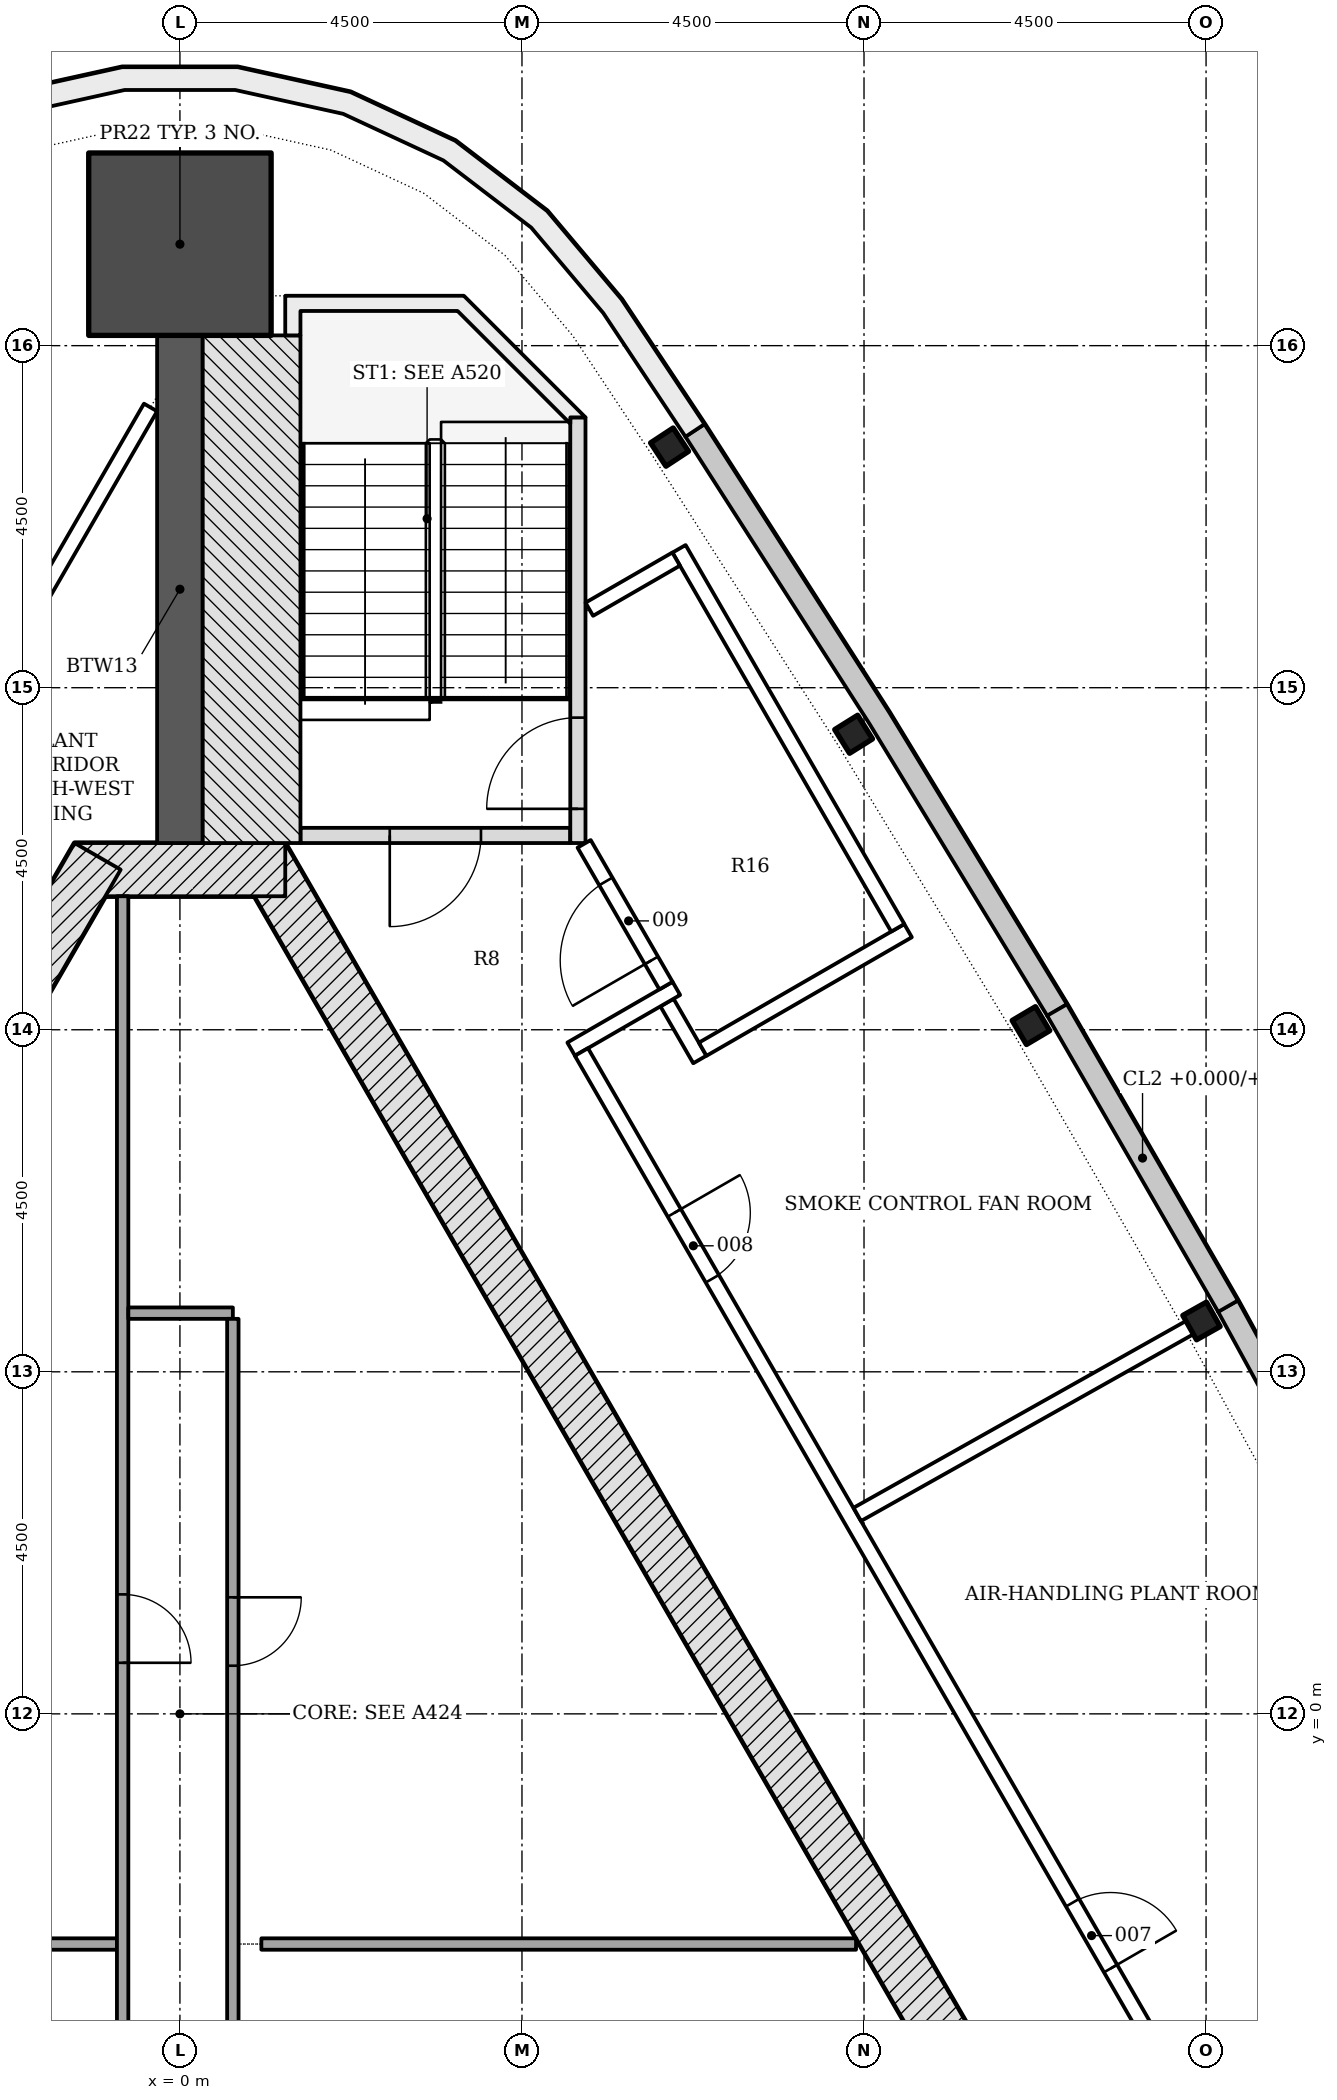
"""IFC4 building model, lengths in metres.
Left out: names, types, materials, properties, quantities, classifications, styles, units other than length and angle.
Written with IfcOpenShell. Run it as: python <this file> out.ifc"""

import sys

from ifc_helpers import new_model, si_unit, direction, frame, frame_2d, origin, origin_2d, place, context, subcontext, project, spatial, polyline, rectangle, i_section, outline, extrude, element, fill, save


model = new_model("IFC4")
c1 = context("Model", 3, precision=1e-05, world=origin(), true_north=direction((0.0, 1.0)))
c2 = subcontext(c1, "Body", "Model", "MODEL_VIEW")
j1 = project(units=[si_unit("LENGTHUNIT", "METRE"), si_unit("PLANEANGLEUNIT", "RADIAN")], contexts=[c1])
p1 = place(None, origin())
s1 = spatial("IfcSite", under=j1, at=p1, CompositionType="ELEMENT")
p2 = place(p1, origin())
s2 = spatial("IfcBuilding", under=s1, at=p2, CompositionType="ELEMENT")
p3 = place(p2, frame((0.0, 0.0, 297.6)))
s3 = spatial("IfcBuildingStorey", under=s2, at=p3, CompositionType="ELEMENT", Elevation=297.6)
p4 = place(p3, frame((10.311, -4.703, -0.25), z_axis=(0.0, 0.0, 1.0), x_axis=(-0.500001446645, 0.866024568562, 0.0)))
e1 = element("IfcWall", 1, at=p4, inside=s3, PredefinedType="SHEAR", context=c2, shape_type="SweptSolid", body=[
    extrude(rectangle(XDim=18.458, YDim=0.7, at=frame_2d((9.229, 0.0))), origin(), (0.0, 0.0, 1.0), 4.5),
])
p5 = place(p3, frame((1.386, 11.106, -0.25), z_axis=(0.0, 0.0, 1.0), x_axis=(-1.0, 0.0, 0.0)))
e2 = element("IfcWall", 2, at=p5, inside=s3, PredefinedType="SHEAR", context=c2, shape_type="SweptSolid", body=[
    extrude(rectangle(XDim=2.771, YDim=0.7, at=frame_2d((1.386, 0.0))), origin(), (0.0, 0.0, 1.0), 4.5),
])
p6 = place(p3, frame((-1.083, 11.281, -0.25), z_axis=(0.0, 0.0, 1.0), x_axis=(-0.500001446645, -0.866024568562, 0.0)))
e3 = element("IfcWall", 3, at=p6, inside=s3, PredefinedType="SHEAR", context=c2, shape_type="SweptSolid", body=[
    extrude(rectangle(XDim=18.458, YDim=0.7, at=frame_2d((9.229, 0.0))), origin(), (0.0, 0.0, 1.0), 4.5),
])
p7 = place(p6, frame((8.979, 0.0, 0.25)))
e4 = element("IfcOpeningElement", 4, at=p7, cuts=e3, PredefinedType="OPENING", context=c2, shape_type="SweptSolid", body=[
    extrude(rectangle(XDim=1.2, YDim=2.1, at=frame_2d((0.6, 1.05))), frame((0.0, 0.36, 0.0), z_axis=(0.0, -1.0, 0.0), x_axis=(1.0, 0.0, 0.0)), (0.0, 0.0, 1.0), 0.72),
])
p8 = place(p6, frame((11.029, 0.0, 0.25)))
e5 = element("IfcOpeningElement", 5, at=p8, cuts=e3, PredefinedType="OPENING", context=c2, shape_type="SweptSolid", body=[
    extrude(rectangle(XDim=1.2, YDim=2.1, at=frame_2d((0.6, 1.05))), frame((0.0, 0.36, 0.0), z_axis=(0.0, -1.0, 0.0), x_axis=(1.0, 0.0, 0.0)), (0.0, 0.0, 1.0), 0.72),
])
p9 = place(p3, frame((0.0, 11.456, -0.25), z_axis=(0.0, 0.0, 1.0), x_axis=(0.0, 1.0, 0.0)))
e6 = element("IfcWall", 6, at=p9, inside=s3, PredefinedType="SHEAR", context=c2, shape_type="SweptSolid", body=[
    extrude(rectangle(XDim=6.679, YDim=0.6, at=frame_2d((3.339, 0.0))), origin(), (0.0, 0.0, 1.0), 4.5),
])
p10 = place(p3, frame((0.0, 19.335, -0.25), z_axis=(0.0, 0.0, 1.0), x_axis=(0.0, 1.0, 0.0)))
e7 = element("IfcColumn", 7, at=p10, inside=s3, PredefinedType="COLUMN", context=c2, shape_type="SweptSolid", body=[
    extrude(rectangle(XDim=2.4, YDim=2.4, at=origin_2d()), origin(), (0.0, 0.0, 1.0), 4.5),
])
for number, where, z_axis, x_axis in (
    (8, (13.44, 5.169, -0.25), (0.0, 0.0, 1.0), (-0.49, 0.872, 0.0)),
    (9, (11.196, 9.055, -0.25), (0.0, 0.0, 1.0), (-0.51, 0.86, 0.0)),
    (10, (8.863, 12.888, -0.25), (0.0, 0.0, 1.0), (-0.53, 0.848, 0.0)),
    (11, (6.442, 16.666, -0.25), (0.0, 0.0, 1.0), (-0.549, 0.836, 0.0)),
):
    element("IfcColumn", number, at=place(p3, frame(where, z_axis=z_axis, x_axis=x_axis)), inside=s3, PredefinedType="COLUMN", context=c2, shape_type="SweptSolid", body=[
        extrude(i_section(OverallWidth=0.368, OverallDepth=0.356, WebThickness=0.011, FlangeThickness=0.018, FilletRadius=0.015, at=origin_2d()), origin(), (0.0, 0.0, 1.0), 4.5),
    ])
p11 = place(p3, origin())
e12 = element("IfcWall", 12, at=p11, inside=s3, PredefinedType="NOTDEFINED", context=c2, shape_type="SweptSolid", body=[
    extrude(outline(polyline([(18.145, -2.507), (16.078, 1.49), (13.919, 5.438), (13.656, 5.294), (15.813, 1.349), (17.878, -2.645), (18.145, -2.507)])), origin(), (0.0, 0.0, 1.0), 4.25),
])
p12 = place(p3, origin())
e13 = element("IfcWall", 13, at=p12, inside=s3, PredefinedType="NOTDEFINED", context=c2, shape_type="SweptSolid", body=[
    extrude(outline(polyline([(11.669, 9.335), (9.33, 13.179), (6.901, 16.968), (6.649, 16.806), (9.075, 13.02), (11.413, 9.179), (11.669, 9.335)])), origin(), (0.0, 0.0, 1.0), 4.25),
])
p13 = place(p3, origin())
e14 = element("IfcWall", 14, at=p13, inside=s3, PredefinedType="NOTDEFINED", context=c2, shape_type="SweptSolid", body=[
    extrude(outline(polyline([(13.919, 5.438), (11.669, 9.335), (11.409, 9.185), (13.659, 5.288), (13.919, 5.438)])), origin(), (0.0, 0.0, 1.0), 1.2),
])
p14 = place(p3, origin())
e15 = element("IfcWall", 15, at=p14, inside=s3, PredefinedType="NOTDEFINED", context=c2, shape_type="SweptSolid", body=[
    extrude(outline(polyline([(11.244, -14.46), (13.211, -14.336), (14.708, -14.069), (16.111, -13.485), (17.355, -12.611), (18.381, -11.49), (19.141, -10.174), (19.599, -8.724), (19.733, -7.21), (19.538, -5.703), (19.021, -4.273), (18.145, -2.507), (17.876, -2.64), (18.745, -4.391), (19.244, -5.774), (19.432, -7.216), (19.303, -8.665), (18.865, -10.052), (18.138, -11.312), (17.156, -12.385), (15.965, -13.22), (14.623, -13.779), (13.176, -14.038), (11.225, -14.161), (11.244, -14.46)])), origin(), (0.0, 0.0, 1.0), 4.25),
])
p15 = place(p3, origin())
e16 = element("IfcWall", 16, at=p15, inside=s3, PredefinedType="NOTDEFINED", context=c2, shape_type="SweptSolid", body=[
    extrude(outline(polyline([(6.901, 16.968), (5.81, 18.61), (4.83, 19.771), (3.623, 20.695), (2.244, 21.335), (0.76, 21.664), (-0.76, 21.664), (-2.244, 21.335), (-3.623, 20.695), (-4.83, 19.771), (-5.81, 18.61), (-6.901, 16.968), (-6.651, 16.802), (-5.569, 18.429), (-4.622, 19.553), (-3.466, 20.437), (-2.147, 21.05), (-0.727, 21.364), (0.727, 21.364), (2.147, 21.05), (3.466, 20.437), (4.622, 19.553), (5.569, 18.429), (6.651, 16.802), (6.901, 16.968)])), origin(), (0.0, 0.0, 1.0), 4.25),
])
p16 = place(p3, frame((-8.895, -3.028, 0.0), z_axis=(0.0, 0.0, 1.0), x_axis=(1.0, 0.0, 0.0)))
e17 = element("IfcWall", 17, at=p16, inside=s3, PredefinedType="PARTITIONING", context=c2, shape_type="SweptSolid", body=[
    extrude(rectangle(XDim=8.066, YDim=0.15, at=frame_2d((4.033, 0.0))), origin(), (0.0, 0.0, 1.0), 4.25),
])
p17 = place(p3, frame((-0.754, 10.756, 0.0), z_axis=(0.0, 0.0, 1.0), x_axis=(0.0, -1.0, 0.0)))
e18 = element("IfcWall", 18, at=p17, inside=s3, PredefinedType="PARTITIONING", context=c2, shape_type="SweptSolid", body=[
    extrude(rectangle(XDim=16.985, YDim=0.15, at=frame_2d((8.492, 0.0))), origin(), (0.0, 0.0, 1.0), 4.25),
])
p18 = place(p17, frame((9.185, 0.0, 0.0)))
e19 = element("IfcOpeningElement", 19, at=p18, cuts=e18, PredefinedType="OPENING", context=c2, shape_type="SweptSolid", body=[
    extrude(rectangle(XDim=0.9, YDim=2.1, at=frame_2d((0.45, 1.05))), frame((0.0, 0.085, 0.0), z_axis=(0.0, -1.0, 0.0), x_axis=(1.0, 0.0, 0.0)), (0.0, 0.0, 1.0), 0.17),
])
p19 = place(p3, frame((-0.679, 5.272, 0.0), z_axis=(0.0, 0.0, 1.0), x_axis=(1.0, 0.0, 0.0)))
e20 = element("IfcWall", 20, at=p19, inside=s3, PredefinedType="PARTITIONING", context=c2, shape_type="SweptSolid", body=[
    extrude(rectangle(XDim=1.375, YDim=0.15, at=frame_2d((0.688, 0.0))), origin(), (0.0, 0.0, 1.0), 4.25),
])
p20 = place(p3, frame((0.696, 5.197, 0.0), z_axis=(0.0, 0.0, 1.0), x_axis=(0.0, -1.0, 0.0)))
e21 = element("IfcWall", 21, at=p20, inside=s3, PredefinedType="PARTITIONING", context=c2, shape_type="SweptSolid", body=[
    extrude(rectangle(XDim=11.425, YDim=0.15, at=frame_2d((5.712, 0.0))), origin(), (0.0, 0.0, 1.0), 4.25),
])
p21 = place(p20, frame((3.664, 0.0, 0.0)))
e22 = element("IfcOpeningElement", 22, at=p21, cuts=e21, PredefinedType="OPENING", context=c2, shape_type="SweptSolid", body=[
    extrude(rectangle(XDim=0.9, YDim=2.1, at=frame_2d((0.45, 1.05))), frame((0.0, 0.085, 0.0), z_axis=(0.0, -1.0, 0.0), x_axis=(1.0, 0.0, 0.0)), (0.0, 0.0, 1.0), 0.17),
])
p22 = place(p3, frame((1.071, -3.028, 0.0), z_axis=(0.0, 0.0, 1.0), x_axis=(1.0, 0.0, 0.0)))
e23 = element("IfcWall", 23, at=p22, inside=s3, PredefinedType="PARTITIONING", context=c2, shape_type="SweptSolid", body=[
    extrude(rectangle(XDim=7.824, YDim=0.15, at=frame_2d((3.912, 0.0))), origin(), (0.0, 0.0, 1.0), 4.25),
])
p23 = place(p3, frame((5.135, 11.556, -0.25), z_axis=(0.0, 0.0, 1.0), x_axis=(-1.0, 0.0, 0.0)))
e24 = element("IfcWall", 24, at=p23, inside=s3, PredefinedType="SHEAR", context=c2, shape_type="SweptSolid", body=[
    extrude(rectangle(XDim=3.55, YDim=0.2, at=frame_2d((1.775, 0.0))), origin(), (0.0, 0.0, 1.0), 4.5),
])
p24 = place(p23, frame((1.175, 0.0, 0.25)))
e25 = element("IfcOpeningElement", 25, at=p24, cuts=e24, PredefinedType="OPENING", context=c2, shape_type="SweptSolid", body=[
    extrude(rectangle(XDim=1.2, YDim=2.1, at=frame_2d((0.6, 1.05))), frame((0.0, 0.11, 0.0), z_axis=(0.0, -1.0, 0.0), x_axis=(1.0, 0.0, 0.0)), (0.0, 0.0, 1.0), 0.22),
])
p25 = place(p3, frame((5.236, 11.456, -0.25), z_axis=(0.0, 0.0, 1.0), x_axis=(0.0, 1.0, 0.0)))
e26 = element("IfcWall", 26, at=p25, inside=s3, PredefinedType="SHEAR", context=c2, shape_type="SweptSolid", body=[
    extrude(rectangle(XDim=5.6, YDim=0.2, at=frame_2d((2.8, 0.0))), origin(), (0.0, 0.0, 1.0), 4.5),
])
p26 = place(p25, frame((0.45, 0.0, 0.25)))
e27 = element("IfcOpeningElement", 27, at=p26, cuts=e26, PredefinedType="OPENING", context=c2, shape_type="SweptSolid", body=[
    extrude(rectangle(XDim=1.2, YDim=2.1, at=frame_2d((0.6, 1.05))), frame((0.0, 0.11, 0.0), z_axis=(0.0, -1.0, 0.0), x_axis=(1.0, 0.0, 0.0)), (0.0, 0.0, 1.0), 0.22),
])
p27 = place(p3, frame((0.943, 11.456, -0.25), z_axis=(0.0, 0.0, 1.0), x_axis=(0.0, 1.0, 0.0)))
e28 = element("IfcWall", 28, at=p27, inside=s3, PredefinedType="SHEAR", context=c2, shape_type="SweptSolid", body=[
    extrude(rectangle(XDim=6.679, YDim=1.286, at=frame_2d((3.339, 0.0))), origin(), (0.0, 0.0, 1.0), 4.5),
])
p28 = place(p3, frame((0.0, 0.0, -0.25)))
e29 = element("IfcWall", 29, at=p28, inside=s3, PredefinedType="SHEAR", context=c2, shape_type="SweptSolid", body=[
    extrude(outline(polyline([(5.336, 17.056), (3.736, 18.656), (1.385, 18.656), (1.385, 18.135), (1.586, 18.135), (1.586, 18.456), (3.653, 18.456), (5.135, 16.974), (5.135, 17.056), (5.135, 17.056), (5.135, 17.056), (5.135, 17.056), (5.135, 17.056), (5.135, 17.056), (5.135, 17.056), (5.135, 17.056), (5.135, 17.056), (5.135, 17.056), (5.135, 17.056), (5.135, 17.056), (5.135, 17.056), (5.135, 17.056), (5.135, 17.056), (5.135, 17.056), (5.135, 17.056), (5.336, 17.056)])), origin(), (0.0, 0.0, 1.0), 4.5),
])
p29 = place(p3, frame((-7.307, 5.2, 0.0), z_axis=(0.0, 0.0, 1.0), x_axis=(0.49999780173, 0.866026672953, 0.0)))
e30 = element("IfcWall", 30, at=p29, inside=s3, PredefinedType="PARTITIONING", context=c2, shape_type="SweptSolid", body=[
    extrude(rectangle(XDim=13.841, YDim=0.2, at=frame_2d((6.92, 0.0))), origin(), (0.0, 0.0, 1.0), 3.702),
])
p30 = place(p29, frame((6.454, 0.0, 0.0)))
e31 = element("IfcOpeningElement", 31, at=p30, cuts=e30, PredefinedType="OPENING", context=c2, shape_type="SweptSolid", body=[
    extrude(rectangle(XDim=1.0, YDim=2.1, at=frame_2d((0.5, 1.05))), frame((0.0, 0.11, 0.0), z_axis=(0.0, -1.0, 0.0), x_axis=(1.0, 0.0, 0.0)), (0.0, 0.0, 1.0), 0.22),
])
p31 = place(p3, frame((6.408, 9.358, 0.0), z_axis=(0.0, 0.0, 1.0), x_axis=(0.49996696679, -0.866044474677, 0.0)))
e32 = element("IfcWall", 32, at=p31, inside=s3, PredefinedType="PARTITIONING", context=c2, shape_type="SweptSolid", body=[
    extrude(rectangle(XDim=0.864, YDim=0.2, at=frame_2d((0.432, 0.0))), origin(), (0.0, 0.0, 1.0), 4.25),
])
p32 = place(p3, frame((5.147, 8.745, 0.0), z_axis=(0.0, 0.0, 1.0), x_axis=(0.865987117328, 0.500066308224, 0.0)))
e33 = element("IfcWall", 33, at=p32, inside=s3, PredefinedType="PARTITIONING", context=c2, shape_type="SweptSolid", body=[
    extrude(rectangle(XDim=1.598, YDim=0.2, at=frame_2d((0.799, 0.0))), origin(), (0.0, 0.0, 1.0), 4.25),
])
p33 = place(p3, frame((6.395, 9.581, 0.0), z_axis=(0.0, 0.0, 1.0), x_axis=(-0.500003735859, 0.866023246874, 0.0)))
e34 = element("IfcWall", 34, at=p33, inside=s3, PredefinedType="PARTITIONING", context=c2, shape_type="SweptSolid", body=[
    extrude(rectangle(XDim=2.154, YDim=0.2, at=frame_2d((1.077, 0.0))), origin(), (0.0, 0.0, 1.0), 3.702),
])
p34 = place(p33, frame((0.383, 0.0, 0.0)))
e35 = element("IfcOpeningElement", 35, at=p34, cuts=e34, PredefinedType="OPENING", context=c2, shape_type="SweptSolid", body=[
    extrude(rectangle(XDim=1.2, YDim=2.1, at=frame_2d((0.6, 1.05))), frame((0.0, 0.11, 0.0), z_axis=(0.0, -1.0, 0.0), x_axis=(1.0, 0.0, 0.0)), (0.0, 0.0, 1.0), 0.22),
])
p35 = place(p3, frame((5.282, 8.708, 0.0), z_axis=(0.0, 0.0, 1.0), x_axis=(0.500001848211, -0.866024336717, 0.0)))
e36 = element("IfcWall", 36, at=p35, inside=s3, PredefinedType="PARTITIONING", context=c2, shape_type="SweptSolid", body=[
    extrude(rectangle(XDim=19.591, YDim=0.2, at=frame_2d((9.795, 0.0))), origin(), (0.0, 0.0, 1.0), 3.702),
])
p36 = place(p35, frame((12.923, 0.0, 0.0)))
e37 = element("IfcOpeningElement", 37, at=p36, cuts=e36, PredefinedType="OPENING", context=c2, shape_type="SweptSolid", body=[
    extrude(rectangle(XDim=1.0, YDim=2.1, at=frame_2d((0.5, 1.05))), frame((0.0, 0.11, 0.0), z_axis=(0.0, -1.0, 0.0), x_axis=(1.0, 0.0, 0.0)), (0.0, 0.0, 1.0), 0.22),
])
p37 = place(p35, frame((2.444, 0.0, 0.0)))
e38 = element("IfcOpeningElement", 38, at=p37, cuts=e36, PredefinedType="OPENING", context=c2, shape_type="SweptSolid", body=[
    extrude(rectangle(XDim=1.0, YDim=2.1, at=frame_2d((0.5, 1.05))), frame((0.0, 0.11, 0.0), z_axis=(0.0, -1.0, 0.0), x_axis=(1.0, 0.0, 0.0)), (0.0, 0.0, 1.0), 0.22),
])
p38 = place(p3, frame((8.911, 2.624, 0.0), z_axis=(0.0, 0.0, 1.0), x_axis=(0.871756434121, 0.48993950603, 0.0)))
e39 = element("IfcWall", 39, at=p38, inside=s3, PredefinedType="PARTITIONING", context=c2, shape_type="SweptSolid", body=[
    extrude(rectangle(XDim=5.044, YDim=0.2, at=frame_2d((2.522, 0.0))), origin(), (0.0, 0.0, 1.0), 3.702),
])
p39 = place(p3, frame((6.878, 8.744, 0.0), z_axis=(0.0, 0.0, 1.0), x_axis=(0.866023983177, 0.500002460556, 0.0)))
e40 = element("IfcWall", 40, at=p39, inside=s3, PredefinedType="PARTITIONING", context=c2, shape_type="SweptSolid", body=[
    extrude(rectangle(XDim=3.12, YDim=0.2, at=frame_2d((1.56, 0.0))), origin(), (0.0, 0.0, 1.0), 4.25),
])
p40 = place(p3, frame((6.566, 15.327, 0.0), z_axis=(0.0, 0.0, 1.0), x_axis=(0.499997778408, -0.866026686418, 0.0)))
e41 = element("IfcWall", 41, at=p40, inside=s3, PredefinedType="PARTITIONING", context=c2, shape_type="SweptSolid", body=[
    extrude(rectangle(XDim=5.757, YDim=0.2, at=frame_2d((2.878, 0.0))), origin(), (0.0, 0.0, 1.0), 3.702),
])
p41 = place(p3, frame((6.529, 15.192, 0.0), z_axis=(0.0, 0.0, 1.0), x_axis=(-0.866117824122, -0.499839889103, 0.0)))
e42 = element("IfcWall", 42, at=p41, inside=s3, PredefinedType="PARTITIONING", context=c2, shape_type="SweptSolid", body=[
    extrude(rectangle(XDim=1.32, YDim=0.2, at=frame_2d((0.66, 0.0))), origin(), (0.0, 0.0, 1.0), 4.25),
])
p42 = place(p18, origin())
e43 = element("IfcDoor", 43, at=p42, inside=s3, OperationType="SINGLE_SWING_RIGHT", PredefinedType="DOOR", context=c2, shape_type="SweptSolid", body=[
    extrude(rectangle(XDim=0.9, YDim=2.1, at=frame_2d((0.45, 1.05))), frame((0.0, 0.025, 0.0), z_axis=(0.0, -1.0, 0.0), x_axis=(1.0, 0.0, 0.0)), (0.0, 0.0, 1.0), 0.05),
])
fill(e19, e43)
p43 = place(p21, origin())
e44 = element("IfcDoor", 44, at=p43, inside=s3, OperationType="SINGLE_SWING_LEFT", PredefinedType="DOOR", context=c2, shape_type="SweptSolid", body=[
    extrude(rectangle(XDim=0.9, YDim=2.1, at=frame_2d((0.45, 1.05))), frame((0.0, 0.025, 0.0), z_axis=(0.0, -1.0, 0.0), x_axis=(1.0, 0.0, 0.0)), (0.0, 0.0, 1.0), 0.05),
])
fill(e22, e44)
p44 = place(p24, origin())
e45 = element("IfcDoor", 45, at=p44, inside=s3, OperationType="SINGLE_SWING_RIGHT", PredefinedType="DOOR", context=c2, shape_type="SweptSolid", body=[
    extrude(rectangle(XDim=1.2, YDim=2.1, at=frame_2d((0.6, 1.05))), frame((0.0, 0.025, 0.0), z_axis=(0.0, -1.0, 0.0), x_axis=(1.0, 0.0, 0.0)), (0.0, 0.0, 1.0), 0.05),
])
fill(e25, e45)
p45 = place(p26, origin())
e46 = element("IfcDoor", 46, at=p45, inside=s3, OperationType="SINGLE_SWING_LEFT", PredefinedType="DOOR", context=c2, shape_type="SweptSolid", body=[
    extrude(rectangle(XDim=1.2, YDim=2.1, at=frame_2d((0.6, 1.05))), frame((0.0, 0.025, 0.0), z_axis=(0.0, -1.0, 0.0), x_axis=(1.0, 0.0, 0.0)), (0.0, 0.0, 1.0), 0.05),
])
fill(e27, e46)
p46 = place(p36, origin())
e47 = element("IfcDoor", 47, at=p46, inside=s3, OperationType="SINGLE_SWING_RIGHT", PredefinedType="DOOR", context=c2, shape_type="SweptSolid", body=[
    extrude(rectangle(XDim=1.0, YDim=2.1, at=frame_2d((0.5, 1.05))), frame((0.0, 0.025, 0.0), z_axis=(0.0, -1.0, 0.0), x_axis=(1.0, 0.0, 0.0)), (0.0, 0.0, 1.0), 0.05),
])
fill(e37, e47)
p47 = place(p37, origin())
e48 = element("IfcDoor", 48, at=p47, inside=s3, OperationType="SINGLE_SWING_LEFT", PredefinedType="DOOR", context=c2, shape_type="SweptSolid", body=[
    extrude(rectangle(XDim=1.0, YDim=2.1, at=frame_2d((0.5, 1.05))), frame((0.0, 0.025, 0.0), z_axis=(0.0, -1.0, 0.0), x_axis=(1.0, 0.0, 0.0)), (0.0, 0.0, 1.0), 0.05),
])
fill(e38, e48)
p48 = place(p34, origin())
e49 = element("IfcDoor", 49, at=p48, inside=s3, OperationType="SINGLE_SWING_LEFT", PredefinedType="DOOR", context=c2, shape_type="SweptSolid", body=[
    extrude(rectangle(XDim=1.2, YDim=2.1, at=frame_2d((0.6, 1.05))), frame((0.0, 0.025, 0.0), z_axis=(0.0, -1.0, 0.0), x_axis=(1.0, 0.0, 0.0)), (0.0, 0.0, 1.0), 0.05),
])
fill(e35, e49)
save(model, sys.argv[1])
